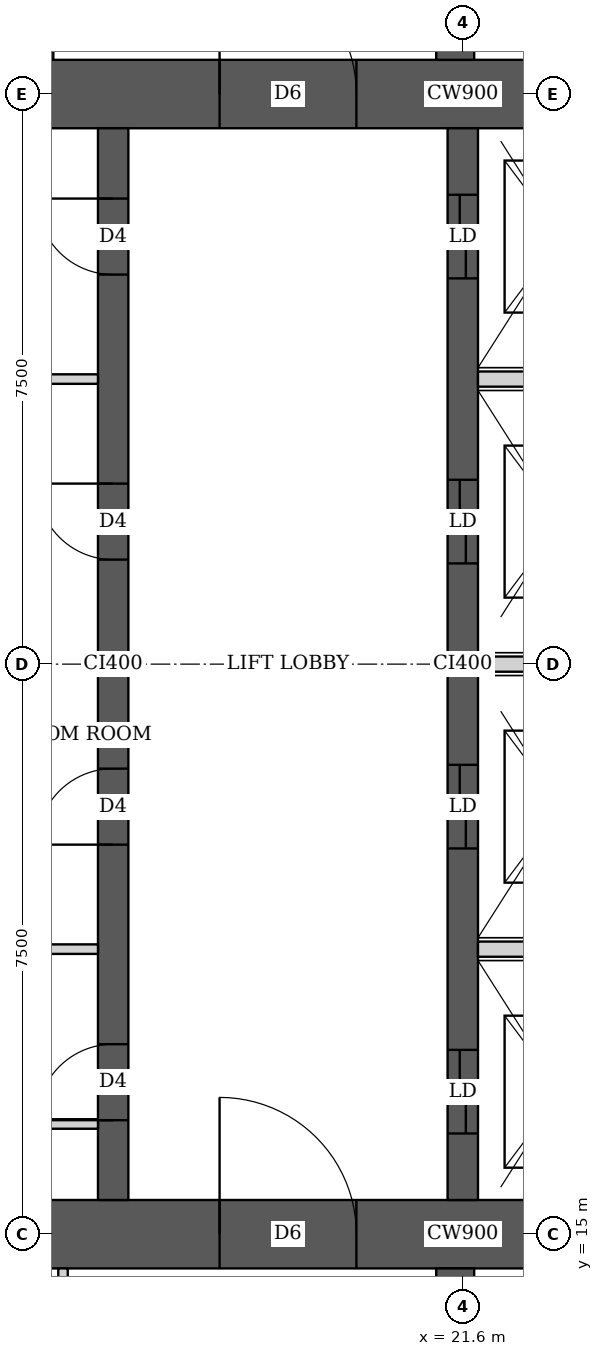
"""IFC4 building model, lengths in metres.
Left out: names, types, materials, properties, quantities, classifications, styles, units other than length and angle.
Written with IfcOpenShell. Run it as: python <this file> out.ifc"""

import sys

from ifc_helpers import new_model, si_unit, direction, frame, frame_2d, origin, place, context, subcontext, project, spatial, rectangle, extrude, element, fill, save


model = new_model("IFC4")
c1 = context("Model", 3, precision=1e-05, world=origin(), true_north=direction((0.0, 1.0)))
c2 = subcontext(c1, "Body", "Model", "MODEL_VIEW")
j1 = project(units=[si_unit("LENGTHUNIT", "METRE"), si_unit("PLANEANGLEUNIT", "RADIAN")], contexts=[c1])
p1 = place(None, origin())
s1 = spatial("IfcSite", under=j1, at=p1, CompositionType="ELEMENT")
p2 = place(p1, origin())
s2 = spatial("IfcBuilding", under=s1, at=p2, CompositionType="ELEMENT")
p3 = place(p2, frame((0.0, 0.0, 285.35)))
s3 = spatial("IfcBuildingStorey", under=s2, at=p3, CompositionType="ELEMENT", Elevation=285.35)
p4 = place(p3, frame((13.95, 15.0, 0.0), z_axis=(0.0, 0.0, 1.0), x_axis=(1.0, 0.0, 0.0)))
e1 = element("IfcWall", 1, at=p4, inside=s3, PredefinedType="SHEAR", context=c2, shape_type="SweptSolid", body=[
    extrude(rectangle(XDim=15.3, YDim=0.9, at=frame_2d((7.65, 0.0))), origin(), (0.0, 0.0, 1.0), 3.75),
])
p5 = place(p4, frame((4.45, 0.0, 0.0)))
e2 = element("IfcOpeningElement", 2, at=p5, cuts=e1, PredefinedType="OPENING", context=c2, shape_type="SweptSolid", body=[
    extrude(rectangle(XDim=1.8, YDim=2.1, at=frame_2d((0.9, 1.05))), frame((0.0, 0.46, 0.0), z_axis=(0.0, -1.0, 0.0), x_axis=(1.0, 0.0, 0.0)), (0.0, 0.0, 1.0), 0.92),
])
p6 = place(p4, frame((10.7, 0.0, 0.0)))
e3 = element("IfcOpeningElement", 3, at=p6, cuts=e1, PredefinedType="OPENING", context=c2, shape_type="SweptSolid", body=[
    extrude(rectangle(XDim=1.1, YDim=2.1, at=frame_2d((0.55, 1.05))), frame((0.0, 0.46, 0.0), z_axis=(0.0, -1.0, 0.0), x_axis=(1.0, 0.0, 0.0)), (0.0, 0.0, 1.0), 0.92),
])
p7 = place(p3, frame((13.95, 30.0, 0.0), z_axis=(0.0, 0.0, 1.0), x_axis=(1.0, 0.0, 0.0)))
e4 = element("IfcWall", 4, at=p7, inside=s3, PredefinedType="SHEAR", context=c2, shape_type="SweptSolid", body=[
    extrude(rectangle(XDim=15.3, YDim=0.9, at=frame_2d((7.65, 0.0))), origin(), (0.0, 0.0, 1.0), 3.75),
])
p8 = place(p7, frame((4.45, 0.0, 0.0)))
e5 = element("IfcOpeningElement", 5, at=p8, cuts=e4, PredefinedType="OPENING", context=c2, shape_type="SweptSolid", body=[
    extrude(rectangle(XDim=1.8, YDim=2.1, at=frame_2d((0.9, 1.05))), frame((0.0, 0.46, 0.0), z_axis=(0.0, -1.0, 0.0), x_axis=(1.0, 0.0, 0.0)), (0.0, 0.0, 1.0), 0.92),
])
p9 = place(p7, frame((10.7, 0.0, 0.0)))
e6 = element("IfcOpeningElement", 6, at=p9, cuts=e4, PredefinedType="OPENING", context=c2, shape_type="SweptSolid", body=[
    extrude(rectangle(XDim=1.1, YDim=2.1, at=frame_2d((0.55, 1.05))), frame((0.0, 0.46, 0.0), z_axis=(0.0, -1.0, 0.0), x_axis=(1.0, 0.0, 0.0)), (0.0, 0.0, 1.0), 0.92),
])
p10 = place(p3, frame((17.0, 15.45, 0.0), z_axis=(0.0, 0.0, 1.0), x_axis=(0.0, 1.0, 0.0)))
e7 = element("IfcWall", 7, at=p10, inside=s3, PredefinedType="SHEAR", context=c2, shape_type="SweptSolid", body=[
    extrude(rectangle(XDim=14.1, YDim=0.4, at=frame_2d((7.05, 0.0))), origin(), (0.0, 0.0, 1.0), 3.75),
])
p11 = place(p10, frame((1.05, 0.0, 0.0)))
e8 = element("IfcOpeningElement", 8, at=p11, cuts=e7, PredefinedType="OPENING", context=c2, shape_type="SweptSolid", body=[
    extrude(rectangle(XDim=1.0, YDim=2.1, at=frame_2d((0.5, 1.05))), frame((0.0, 0.21, 0.0), z_axis=(0.0, -1.0, 0.0), x_axis=(1.0, 0.0, 0.0)), (0.0, 0.0, 1.0), 0.42),
])
p12 = place(p10, frame((4.675, 0.0, 0.0)))
e9 = element("IfcOpeningElement", 9, at=p12, cuts=e7, PredefinedType="OPENING", context=c2, shape_type="SweptSolid", body=[
    extrude(rectangle(XDim=1.0, YDim=2.1, at=frame_2d((0.5, 1.05))), frame((0.0, 0.21, 0.0), z_axis=(0.0, -1.0, 0.0), x_axis=(1.0, 0.0, 0.0)), (0.0, 0.0, 1.0), 0.42),
])
p13 = place(p10, frame((8.425, 0.0, 0.0)))
e10 = element("IfcOpeningElement", 10, at=p13, cuts=e7, PredefinedType="OPENING", context=c2, shape_type="SweptSolid", body=[
    extrude(rectangle(XDim=1.0, YDim=2.1, at=frame_2d((0.5, 1.05))), frame((0.0, 0.21, 0.0), z_axis=(0.0, -1.0, 0.0), x_axis=(1.0, 0.0, 0.0)), (0.0, 0.0, 1.0), 0.42),
])
p14 = place(p10, frame((12.175, 0.0, 0.0)))
e11 = element("IfcOpeningElement", 11, at=p14, cuts=e7, PredefinedType="OPENING", context=c2, shape_type="SweptSolid", body=[
    extrude(rectangle(XDim=1.0, YDim=2.1, at=frame_2d((0.5, 1.05))), frame((0.0, 0.21, 0.0), z_axis=(0.0, -1.0, 0.0), x_axis=(1.0, 0.0, 0.0)), (0.0, 0.0, 1.0), 0.42),
])
p15 = place(p3, frame((21.6, 15.45, 0.0), z_axis=(0.0, 0.0, 1.0), x_axis=(0.0, 1.0, 0.0)))
e12 = element("IfcWall", 12, at=p15, inside=s3, PredefinedType="SHEAR", context=c2, shape_type="SweptSolid", body=[
    extrude(rectangle(XDim=14.1, YDim=0.4, at=frame_2d((7.05, 0.0))), origin(), (0.0, 0.0, 1.0), 3.75),
])
p16 = place(p15, frame((0.875, 0.0, 0.0)))
e13 = element("IfcOpeningElement", 13, at=p16, cuts=e12, PredefinedType="OPENING", context=c2, shape_type="SweptSolid", body=[
    extrude(rectangle(XDim=1.1, YDim=2.1, at=frame_2d((0.55, 1.05))), frame((0.0, 0.21, 0.0), z_axis=(0.0, -1.0, 0.0), x_axis=(1.0, 0.0, 0.0)), (0.0, 0.0, 1.0), 0.42),
])
p17 = place(p15, frame((4.625, 0.0, 0.0)))
e14 = element("IfcOpeningElement", 14, at=p17, cuts=e12, PredefinedType="OPENING", context=c2, shape_type="SweptSolid", body=[
    extrude(rectangle(XDim=1.1, YDim=2.1, at=frame_2d((0.55, 1.05))), frame((0.0, 0.21, 0.0), z_axis=(0.0, -1.0, 0.0), x_axis=(1.0, 0.0, 0.0)), (0.0, 0.0, 1.0), 0.42),
])
p18 = place(p15, frame((8.375, 0.0, 0.0)))
e15 = element("IfcOpeningElement", 15, at=p18, cuts=e12, PredefinedType="OPENING", context=c2, shape_type="SweptSolid", body=[
    extrude(rectangle(XDim=1.1, YDim=2.1, at=frame_2d((0.55, 1.05))), frame((0.0, 0.21, 0.0), z_axis=(0.0, -1.0, 0.0), x_axis=(1.0, 0.0, 0.0)), (0.0, 0.0, 1.0), 0.42),
])
p19 = place(p15, frame((12.125, 0.0, 0.0)))
e16 = element("IfcOpeningElement", 16, at=p19, cuts=e12, PredefinedType="OPENING", context=c2, shape_type="SweptSolid", body=[
    extrude(rectangle(XDim=1.1, YDim=2.1, at=frame_2d((0.55, 1.05))), frame((0.0, 0.21, 0.0), z_axis=(0.0, -1.0, 0.0), x_axis=(1.0, 0.0, 0.0)), (0.0, 0.0, 1.0), 0.42),
])
for number, where, z_axis, x_axis in (
    (17, (21.5, 10.35, 0.0), (0.0, 0.0, 1.0), (0.0, 1.0, 0.0)),
    (18, (21.5, 30.45, 0.0), (0.0, 0.0, 1.0), (0.0, 1.0, 0.0)),
):
    element("IfcWall", number, at=place(p3, frame(where, z_axis=z_axis, x_axis=x_axis)), inside=s3, PredefinedType="SHEAR", context=c2, shape_type="SweptSolid", body=[
        extrude(rectangle(XDim=4.2, YDim=0.5, at=frame_2d((2.1, 0.0))), origin(), (0.0, 0.0, 1.0), 3.75),
    ])
p20 = place(p3, frame((16.34, 10.562, 0.0), z_axis=(0.0, 0.0, 1.0), x_axis=(0.0, 1.0, 0.0)))
e19 = element("IfcWall", 19, at=p20, inside=s3, PredefinedType="PARTITIONING", context=c2, shape_type="SweptSolid", body=[
    extrude(rectangle(XDim=3.988, YDim=0.125, at=frame_2d((1.994, 0.0))), origin(), (0.0, 0.0, 1.0), 3.5),
])
p21 = place(p20, frame((1.438, 0.0, 0.0)))
e20 = element("IfcOpeningElement", 20, at=p21, cuts=e19, PredefinedType="OPENING", context=c2, shape_type="SweptSolid", body=[
    extrude(rectangle(XDim=1.0, YDim=2.1, at=frame_2d((0.5, 1.05))), frame((0.0, 0.073, 0.0), z_axis=(0.0, -1.0, 0.0), x_axis=(1.0, 0.0, 0.0)), (0.0, 0.0, 1.0), 0.145),
])
p22 = place(p3, frame((16.15, 30.45, 0.0), z_axis=(0.0, 0.0, 1.0), x_axis=(0.0, 1.0, 0.0)))
e21 = element("IfcWall", 21, at=p22, inside=s3, PredefinedType="PARTITIONING", context=c2, shape_type="SweptSolid", body=[
    extrude(rectangle(XDim=4.387, YDim=0.125, at=frame_2d((2.193, 0.0))), origin(), (0.0, 0.0, 1.0), 3.5),
])
p23 = place(p22, frame((1.75, 0.0, 0.0)))
e22 = element("IfcOpeningElement", 22, at=p23, cuts=e21, PredefinedType="OPENING", context=c2, shape_type="SweptSolid", body=[
    extrude(rectangle(XDim=1.0, YDim=2.1, at=frame_2d((0.5, 1.05))), frame((0.0, 0.073, 0.0), z_axis=(0.0, -1.0, 0.0), x_axis=(1.0, 0.0, 0.0)), (0.0, 0.0, 1.0), 0.145),
])
p24 = place(p3, frame((14.85, 16.45, 0.0), z_axis=(0.0, 0.0, 1.0), x_axis=(1.0, 0.0, 0.0)))
e23 = element("IfcWall", 23, at=p24, inside=s3, PredefinedType="PARTITIONING", context=c2, shape_type="SweptSolid", body=[
    extrude(rectangle(XDim=1.95, YDim=0.125, at=frame_2d((0.975, 0.0))), origin(), (0.0, 0.0, 1.0), 3.5),
])
p25 = place(p24, frame((0.2, 0.0, 0.0)))
e24 = element("IfcOpeningElement", 24, at=p25, cuts=e23, PredefinedType="OPENING", context=c2, shape_type="SweptSolid", body=[
    extrude(rectangle(XDim=1.0, YDim=2.1, at=frame_2d((0.5, 1.05))), frame((0.0, 0.073, 0.0), z_axis=(0.0, -1.0, 0.0), x_axis=(1.0, 0.0, 0.0)), (0.0, 0.0, 1.0), 0.145),
])
for number, where, z_axis, x_axis in (
    (25, (14.85, 18.75, 0.0), (0.0, 0.0, 1.0), (1.0, 0.0, 0.0)),
    (26, (14.85, 26.25, 0.0), (0.0, 0.0, 1.0), (1.0, 0.0, 0.0)),
):
    element("IfcWall", number, at=place(p3, frame(where, z_axis=z_axis, x_axis=x_axis)), inside=s3, PredefinedType="PARTITIONING", context=c2, shape_type="SweptSolid", body=[
        extrude(rectangle(XDim=1.95, YDim=0.125, at=frame_2d((0.975, 0.0))), origin(), (0.0, 0.0, 1.0), 3.5),
    ])
for number, where, z_axis, x_axis in (
    (27, (21.8, 18.75, 0.0), (0.0, 0.0, 1.0), (1.0, 0.0, 0.0)),
    (28, (21.8, 22.5, 0.0), (0.0, 0.0, 1.0), (1.0, 0.0, 0.0)),
    (29, (21.8, 26.25, 0.0), (0.0, 0.0, 1.0), (1.0, 0.0, 0.0)),
):
    element("IfcWall", number, at=place(p3, frame(where, z_axis=z_axis, x_axis=x_axis)), inside=s3, PredefinedType="SOLIDWALL", context=c2, shape_type="SweptSolid", body=[
        extrude(rectangle(XDim=2.2, YDim=0.2, at=frame_2d((1.1, 0.0))), origin(), (0.0, 0.0, 1.0), 3.5),
    ])
p26 = place(p11, origin())
e30 = element("IfcDoor", 30, at=p26, inside=s3, OperationType="SINGLE_SWING_LEFT", PredefinedType="DOOR", context=c2, shape_type="SweptSolid", body=[
    extrude(rectangle(XDim=1.0, YDim=2.1, at=frame_2d((0.5, 1.05))), frame((0.0, 0.025, 0.0), z_axis=(0.0, -1.0, 0.0), x_axis=(1.0, 0.0, 0.0)), (0.0, 0.0, 1.0), 0.05),
])
fill(e8, e30)
p27 = place(p12, origin())
e31 = element("IfcDoor", 31, at=p27, inside=s3, OperationType="SINGLE_SWING_LEFT", PredefinedType="DOOR", context=c2, shape_type="SweptSolid", body=[
    extrude(rectangle(XDim=1.0, YDim=2.1, at=frame_2d((0.5, 1.05))), frame((0.0, 0.025, 0.0), z_axis=(0.0, -1.0, 0.0), x_axis=(1.0, 0.0, 0.0)), (0.0, 0.0, 1.0), 0.05),
])
fill(e9, e31)
p28 = place(p13, origin())
e32 = element("IfcDoor", 32, at=p28, inside=s3, OperationType="SINGLE_SWING_RIGHT", PredefinedType="DOOR", context=c2, shape_type="SweptSolid", body=[
    extrude(rectangle(XDim=1.0, YDim=2.1, at=frame_2d((0.5, 1.05))), frame((0.0, 0.025, 0.0), z_axis=(0.0, -1.0, 0.0), x_axis=(1.0, 0.0, 0.0)), (0.0, 0.0, 1.0), 0.05),
])
fill(e10, e32)
p29 = place(p14, origin())
e33 = element("IfcDoor", 33, at=p29, inside=s3, OperationType="SINGLE_SWING_RIGHT", PredefinedType="DOOR", context=c2, shape_type="SweptSolid", body=[
    extrude(rectangle(XDim=1.0, YDim=2.1, at=frame_2d((0.5, 1.05))), frame((0.0, 0.025, 0.0), z_axis=(0.0, -1.0, 0.0), x_axis=(1.0, 0.0, 0.0)), (0.0, 0.0, 1.0), 0.05),
])
fill(e11, e33)
p30 = place(p5, origin())
e34 = element("IfcDoor", 34, at=p30, inside=s3, OperationType="DOUBLE_DOOR_SINGLE_SWING", PredefinedType="DOOR", context=c2, shape_type="SweptSolid", body=[
    extrude(rectangle(XDim=1.8, YDim=2.1, at=frame_2d((0.9, 1.05))), frame((0.0, 0.025, 0.0), z_axis=(0.0, -1.0, 0.0), x_axis=(1.0, 0.0, 0.0)), (0.0, 0.0, 1.0), 0.05),
])
fill(e2, e34)
p31 = place(p8, origin())
e35 = element("IfcDoor", 35, at=p31, inside=s3, OperationType="DOUBLE_DOOR_SINGLE_SWING", PredefinedType="DOOR", context=c2, shape_type="SweptSolid", body=[
    extrude(rectangle(XDim=1.8, YDim=2.1, at=frame_2d((0.9, 1.05))), frame((0.0, 0.025, 0.0), z_axis=(0.0, -1.0, 0.0), x_axis=(1.0, 0.0, 0.0)), (0.0, 0.0, 1.0), 0.05),
])
fill(e5, e35)
p32 = place(p16, origin())
e36 = element("IfcDoor", 36, at=p32, inside=s3, OperationType="DOUBLE_DOOR_SLIDING", PredefinedType="DOOR", context=c2, shape_type="SweptSolid", body=[
    extrude(rectangle(XDim=1.1, YDim=2.1, at=frame_2d((0.55, 1.05))), frame((0.0, 0.025, 0.0), z_axis=(0.0, -1.0, 0.0), x_axis=(1.0, 0.0, 0.0)), (0.0, 0.0, 1.0), 0.05),
])
fill(e13, e36)
p33 = place(p17, origin())
e37 = element("IfcDoor", 37, at=p33, inside=s3, OperationType="DOUBLE_DOOR_SLIDING", PredefinedType="DOOR", context=c2, shape_type="SweptSolid", body=[
    extrude(rectangle(XDim=1.1, YDim=2.1, at=frame_2d((0.55, 1.05))), frame((0.0, 0.025, 0.0), z_axis=(0.0, -1.0, 0.0), x_axis=(1.0, 0.0, 0.0)), (0.0, 0.0, 1.0), 0.05),
])
fill(e14, e37)
p34 = place(p18, origin())
e38 = element("IfcDoor", 38, at=p34, inside=s3, OperationType="DOUBLE_DOOR_SLIDING", PredefinedType="DOOR", context=c2, shape_type="SweptSolid", body=[
    extrude(rectangle(XDim=1.1, YDim=2.1, at=frame_2d((0.55, 1.05))), frame((0.0, 0.025, 0.0), z_axis=(0.0, -1.0, 0.0), x_axis=(1.0, 0.0, 0.0)), (0.0, 0.0, 1.0), 0.05),
])
fill(e15, e38)
p35 = place(p19, origin())
e39 = element("IfcDoor", 39, at=p35, inside=s3, OperationType="DOUBLE_DOOR_SLIDING", PredefinedType="DOOR", context=c2, shape_type="SweptSolid", body=[
    extrude(rectangle(XDim=1.1, YDim=2.1, at=frame_2d((0.55, 1.05))), frame((0.0, 0.025, 0.0), z_axis=(0.0, -1.0, 0.0), x_axis=(1.0, 0.0, 0.0)), (0.0, 0.0, 1.0), 0.05),
])
fill(e16, e39)
save(model, sys.argv[1])
